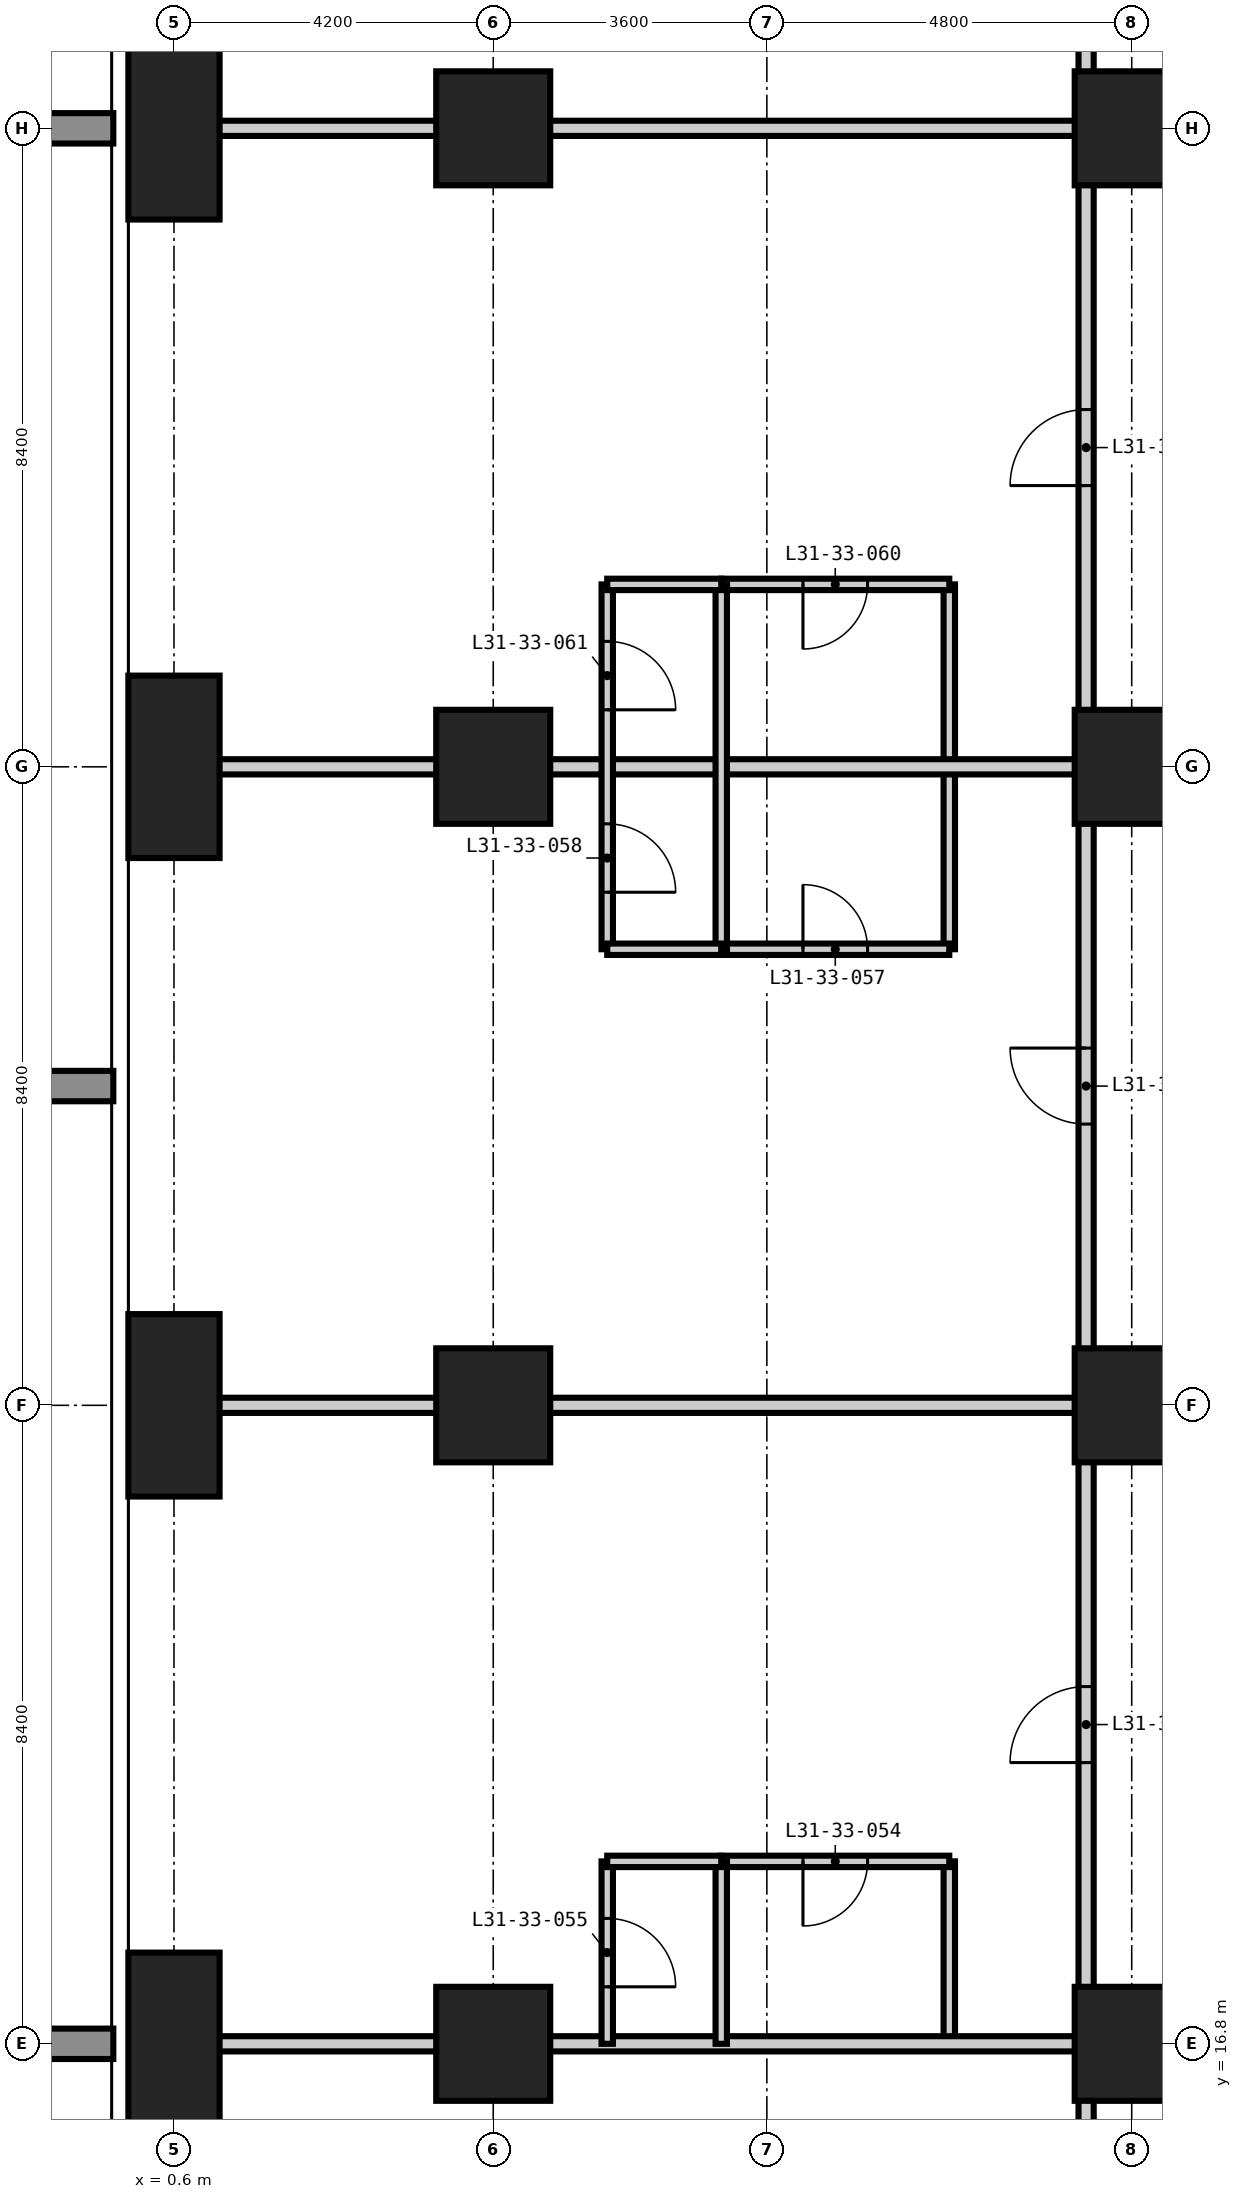
"""IFC4 building model, lengths in metres.
Left out: names, types, materials, properties, quantities, classifications, styles, units other than length and angle.
Written with IfcOpenShell. Run it as: python <this file> out.ifc"""

import sys

from ifc_helpers import new_model, si_unit, direction, frame, frame_2d, origin, origin_2d, place, context, subcontext, project, spatial, rectangle, extrude, element, fill, save


model = new_model("IFC4")
c1 = context("Model", 3, precision=1e-05, world=origin(), true_north=direction((0.0, 1.0)))
c2 = subcontext(c1, "Body", "Model", "MODEL_VIEW")
j1 = project(units=[si_unit("LENGTHUNIT", "METRE"), si_unit("PLANEANGLEUNIT", "RADIAN")], contexts=[c1])
p1 = place(None, origin())
s1 = spatial("IfcSite", under=j1, at=p1, CompositionType="ELEMENT")
p2 = place(p1, origin())
s2 = spatial("IfcBuilding", under=s1, at=p2, CompositionType="ELEMENT")
p3 = place(p2, frame((0.0, 0.0, 122.4)))
s3 = spatial("IfcBuildingStorey", under=s2, at=p3, CompositionType="ELEMENT", Elevation=122.4)
for number, where, z_axis, x_axis in (
    (1, (0.6, 16.8, -0.35), (0.0, 0.0, 1.0), (1.0, 0.0, 0.0)),
    (2, (0.6, 25.2, -0.35), (0.0, 0.0, 1.0), (1.0, 0.0, 0.0)),
    (3, (0.6, 33.6, -0.35), (0.0, 0.0, 1.0), (1.0, 0.0, 0.0)),
    (4, (0.6, 42.0, -0.35), (0.0, 0.0, 1.0), (1.0, 0.0, 0.0)),
):
    element("IfcColumn", number, at=place(p3, frame(where, z_axis=z_axis, x_axis=x_axis)), inside=s3, PredefinedType="COLUMN", context=c2, shape_type="SweptSolid", body=[
        extrude(rectangle(XDim=1.2, YDim=2.4, at=origin_2d()), origin(), (0.0, 0.0, 1.0), 3.6),
    ])
for number, where, z_axis, x_axis in (
    (5, (4.8, 16.8, -0.35), (0.0, 0.0, 1.0), (1.0, 0.0, 0.0)),
    (6, (4.8, 25.2, -0.35), (0.0, 0.0, 1.0), (1.0, 0.0, 0.0)),
    (7, (4.8, 33.6, -0.35), (0.0, 0.0, 1.0), (1.0, 0.0, 0.0)),
    (8, (4.8, 42.0, -0.35), (0.0, 0.0, 1.0), (1.0, 0.0, 0.0)),
    (9, (13.2, 16.8, -0.35), (0.0, 0.0, 1.0), (1.0, 0.0, 0.0)),
    (10, (13.2, 25.2, -0.35), (0.0, 0.0, 1.0), (1.0, 0.0, 0.0)),
    (11, (13.2, 33.6, -0.35), (0.0, 0.0, 1.0), (1.0, 0.0, 0.0)),
    (12, (13.2, 42.0, -0.35), (0.0, 0.0, 1.0), (1.0, 0.0, 0.0)),
):
    element("IfcColumn", number, at=place(p3, frame(where, z_axis=z_axis, x_axis=x_axis)), inside=s3, PredefinedType="COLUMN", context=c2, shape_type="SweptSolid", body=[
        extrude(rectangle(XDim=1.5, YDim=1.5, at=origin_2d()), origin(), (0.0, 0.0, 1.0), 3.6),
    ])
p4 = place(p3, frame((10.8, 16.8, 0.0), z_axis=(0.0, 0.0, 1.0), x_axis=(0.0, 1.0, 0.0)))
e13 = element("IfcWall", 13, at=p4, inside=s3, PredefinedType="PARTITIONING", context=c2, shape_type="SweptSolid", body=[
    extrude(rectangle(XDim=2.4, YDim=0.15, at=frame_2d((1.2, 0.0))), origin(), (0.0, 0.0, 1.0), 3.25),
])
p5 = place(p3, frame((10.8, 31.2, 0.0), z_axis=(0.0, 0.0, 1.0), x_axis=(0.0, 1.0, 0.0)))
e14 = element("IfcWall", 14, at=p5, inside=s3, PredefinedType="PARTITIONING", context=c2, shape_type="SweptSolid", body=[
    extrude(rectangle(XDim=4.8, YDim=0.15, at=frame_2d((2.4, 0.0))), origin(), (0.0, 0.0, 1.0), 3.25),
])
p6 = place(p3, frame((7.8, 19.2, 0.0), z_axis=(0.0, 0.0, 1.0), x_axis=(1.0, 0.0, 0.0)))
e15 = element("IfcWall", 15, at=p6, inside=s3, PredefinedType="PARTITIONING", context=c2, shape_type="SweptSolid", body=[
    extrude(rectangle(XDim=3.0, YDim=0.15, at=frame_2d((1.5, 0.0))), origin(), (0.0, 0.0, 1.0), 3.25),
])
p7 = place(p6, frame((1.075, 0.0, 0.0)))
e16 = element("IfcOpeningElement", 16, at=p7, cuts=e15, PredefinedType="OPENING", context=c2, shape_type="SweptSolid", body=[
    extrude(rectangle(XDim=0.85, YDim=2.1, at=frame_2d((0.425, 1.05))), frame((0.0, 0.085, 0.0), z_axis=(0.0, -1.0, 0.0), x_axis=(1.0, 0.0, 0.0)), (0.0, 0.0, 1.0), 0.17),
])
p8 = place(p3, frame((7.8, 31.2, 0.0), z_axis=(0.0, 0.0, 1.0), x_axis=(1.0, 0.0, 0.0)))
e17 = element("IfcWall", 17, at=p8, inside=s3, PredefinedType="PARTITIONING", context=c2, shape_type="SweptSolid", body=[
    extrude(rectangle(XDim=3.0, YDim=0.15, at=frame_2d((1.5, 0.0))), origin(), (0.0, 0.0, 1.0), 3.25),
])
p9 = place(p8, frame((1.075, 0.0, 0.0)))
e18 = element("IfcOpeningElement", 18, at=p9, cuts=e17, PredefinedType="OPENING", context=c2, shape_type="SweptSolid", body=[
    extrude(rectangle(XDim=0.85, YDim=2.1, at=frame_2d((0.425, 1.05))), frame((0.0, 0.085, 0.0), z_axis=(0.0, -1.0, 0.0), x_axis=(1.0, 0.0, 0.0)), (0.0, 0.0, 1.0), 0.17),
])
p10 = place(p3, frame((7.8, 36.0, 0.0), z_axis=(0.0, 0.0, 1.0), x_axis=(1.0, 0.0, 0.0)))
e19 = element("IfcWall", 19, at=p10, inside=s3, PredefinedType="PARTITIONING", context=c2, shape_type="SweptSolid", body=[
    extrude(rectangle(XDim=3.0, YDim=0.15, at=frame_2d((1.5, 0.0))), origin(), (0.0, 0.0, 1.0), 3.25),
])
p11 = place(p10, frame((1.075, 0.0, 0.0)))
e20 = element("IfcOpeningElement", 20, at=p11, cuts=e19, PredefinedType="OPENING", context=c2, shape_type="SweptSolid", body=[
    extrude(rectangle(XDim=0.85, YDim=2.1, at=frame_2d((0.425, 1.05))), frame((0.0, 0.085, 0.0), z_axis=(0.0, -1.0, 0.0), x_axis=(1.0, 0.0, 0.0)), (0.0, 0.0, 1.0), 0.17),
])
p12 = place(p3, frame((12.6, 13.675, 0.0), z_axis=(0.0, 0.0, 1.0), x_axis=(0.0, 1.0, 0.0)))
e21 = element("IfcWall", 21, at=p12, inside=s3, PredefinedType="PARTITIONING", context=c2, shape_type="SweptSolid", body=[
    extrude(rectangle(XDim=32.05, YDim=0.2, at=frame_2d((16.025, 0.0))), origin(), (0.0, 0.0, 1.0), 3.25),
])
p13 = place(p12, frame((6.825, 0.0, 0.0)))
e22 = element("IfcOpeningElement", 22, at=p13, cuts=e21, PredefinedType="OPENING", context=c2, shape_type="SweptSolid", body=[
    extrude(rectangle(XDim=1.0, YDim=2.2, at=frame_2d((0.5, 1.1))), frame((0.0, 0.11, 0.0), z_axis=(0.0, -1.0, 0.0), x_axis=(1.0, 0.0, 0.0)), (0.0, 0.0, 1.0), 0.22),
])
p14 = place(p12, frame((15.225, 0.0, 0.0)))
e23 = element("IfcOpeningElement", 23, at=p14, cuts=e21, PredefinedType="OPENING", context=c2, shape_type="SweptSolid", body=[
    extrude(rectangle(XDim=1.0, YDim=2.2, at=frame_2d((0.5, 1.1))), frame((0.0, 0.11, 0.0), z_axis=(0.0, -1.0, 0.0), x_axis=(1.0, 0.0, 0.0)), (0.0, 0.0, 1.0), 0.22),
])
p15 = place(p12, frame((23.625, 0.0, 0.0)))
e24 = element("IfcOpeningElement", 24, at=p15, cuts=e21, PredefinedType="OPENING", context=c2, shape_type="SweptSolid", body=[
    extrude(rectangle(XDim=1.0, YDim=2.2, at=frame_2d((0.5, 1.1))), frame((0.0, 0.11, 0.0), z_axis=(0.0, -1.0, 0.0), x_axis=(1.0, 0.0, 0.0)), (0.0, 0.0, 1.0), 0.22),
])
p16 = place(p12, frame((1.063, 0.0, 0.0)))
e25 = element("IfcOpeningElement", 25, at=p16, cuts=e21, PredefinedType="OPENING", context=c2, shape_type="SweptSolid", body=[
    extrude(rectangle(XDim=1.0, YDim=2.2, at=frame_2d((0.5, 1.1))), frame((0.0, 0.11, 0.0), z_axis=(0.0, -1.0, 0.0), x_axis=(1.0, 0.0, 0.0)), (0.0, 0.0, 1.0), 0.22),
])
p17 = place(p12, frame((29.687, 0.0, 0.0)))
e26 = element("IfcOpeningElement", 26, at=p17, cuts=e21, PredefinedType="OPENING", context=c2, shape_type="SweptSolid", body=[
    extrude(rectangle(XDim=1.0, YDim=2.2, at=frame_2d((0.5, 1.1))), frame((0.0, 0.11, 0.0), z_axis=(0.0, -1.0, 0.0), x_axis=(1.0, 0.0, 0.0)), (0.0, 0.0, 1.0), 0.22),
])
for number, where, z_axis, x_axis in (
    (27, (-0.018, 16.8, 0.0), (0.0, 0.0, 1.0), (1.0, 0.0, 0.0)),
    (28, (-0.018, 25.2, 0.0), (0.0, 0.0, 1.0), (1.0, 0.0, 0.0)),
    (29, (-0.018, 33.6, 0.0), (0.0, 0.0, 1.0), (1.0, 0.0, 0.0)),
    (30, (-0.018, 42.0, 0.0), (0.0, 0.0, 1.0), (1.0, 0.0, 0.0)),
):
    element("IfcWall", number, at=place(p3, frame(where, z_axis=z_axis, x_axis=x_axis)), inside=s3, PredefinedType="PARTITIONING", context=c2, shape_type="SweptSolid", body=[
        extrude(rectangle(XDim=12.618, YDim=0.2, at=frame_2d((6.309, 0.0))), origin(), (0.0, 0.0, 1.0), 3.25),
    ])
p18 = place(p3, frame((6.3, 16.8, 0.0), z_axis=(0.0, 0.0, 1.0), x_axis=(0.0, 1.0, 0.0)))
e31 = element("IfcWall", 31, at=p18, inside=s3, PredefinedType="PARTITIONING", context=c2, shape_type="SweptSolid", body=[
    extrude(rectangle(XDim=2.4, YDim=0.15, at=frame_2d((1.2, 0.0))), origin(), (0.0, 0.0, 1.0), 3.25),
])
p19 = place(p18, frame((0.75, 0.0, 0.0)))
e32 = element("IfcOpeningElement", 32, at=p19, cuts=e31, PredefinedType="OPENING", context=c2, shape_type="SweptSolid", body=[
    extrude(rectangle(XDim=0.9, YDim=2.1, at=frame_2d((0.45, 1.05))), frame((0.0, 0.085, 0.0), z_axis=(0.0, -1.0, 0.0), x_axis=(1.0, 0.0, 0.0)), (0.0, 0.0, 1.0), 0.17),
])
p20 = place(p3, frame((6.3, 31.2, 0.0), z_axis=(0.0, 0.0, 1.0), x_axis=(0.0, 1.0, 0.0)))
e33 = element("IfcWall", 33, at=p20, inside=s3, PredefinedType="PARTITIONING", context=c2, shape_type="SweptSolid", body=[
    extrude(rectangle(XDim=4.8, YDim=0.15, at=frame_2d((2.4, 0.0))), origin(), (0.0, 0.0, 1.0), 3.25),
])
p21 = place(p20, frame((0.75, 0.0, 0.0)))
e34 = element("IfcOpeningElement", 34, at=p21, cuts=e33, PredefinedType="OPENING", context=c2, shape_type="SweptSolid", body=[
    extrude(rectangle(XDim=0.9, YDim=2.1, at=frame_2d((0.45, 1.05))), frame((0.0, 0.085, 0.0), z_axis=(0.0, -1.0, 0.0), x_axis=(1.0, 0.0, 0.0)), (0.0, 0.0, 1.0), 0.17),
])
p22 = place(p20, frame((3.15, 0.0, 0.0)))
e35 = element("IfcOpeningElement", 35, at=p22, cuts=e33, PredefinedType="OPENING", context=c2, shape_type="SweptSolid", body=[
    extrude(rectangle(XDim=0.9, YDim=2.1, at=frame_2d((0.45, 1.05))), frame((0.0, 0.085, 0.0), z_axis=(0.0, -1.0, 0.0), x_axis=(1.0, 0.0, 0.0)), (0.0, 0.0, 1.0), 0.17),
])
p23 = place(p3, frame((7.8, 16.8, 0.0), z_axis=(0.0, 0.0, 1.0), x_axis=(0.0, 1.0, 0.0)))
e36 = element("IfcWall", 36, at=p23, inside=s3, PredefinedType="PARTITIONING", context=c2, shape_type="SweptSolid", body=[
    extrude(rectangle(XDim=2.4, YDim=0.15, at=frame_2d((1.2, 0.0))), origin(), (0.0, 0.0, 1.0), 3.25),
])
p24 = place(p3, frame((7.8, 31.2, 0.0), z_axis=(0.0, 0.0, 1.0), x_axis=(0.0, 1.0, 0.0)))
e37 = element("IfcWall", 37, at=p24, inside=s3, PredefinedType="PARTITIONING", context=c2, shape_type="SweptSolid", body=[
    extrude(rectangle(XDim=4.8, YDim=0.15, at=frame_2d((2.4, 0.0))), origin(), (0.0, 0.0, 1.0), 3.25),
])
for number, where, z_axis, x_axis in (
    (38, (6.3, 19.2, 0.0), (0.0, 0.0, 1.0), (1.0, 0.0, 0.0)),
    (39, (6.3, 31.2, 0.0), (0.0, 0.0, 1.0), (1.0, 0.0, 0.0)),
    (40, (6.3, 36.0, 0.0), (0.0, 0.0, 1.0), (1.0, 0.0, 0.0)),
):
    element("IfcWall", number, at=place(p3, frame(where, z_axis=z_axis, x_axis=x_axis)), inside=s3, PredefinedType="PARTITIONING", context=c2, shape_type="SweptSolid", body=[
        extrude(rectangle(XDim=1.5, YDim=0.15, at=frame_2d((0.75, 0.0))), origin(), (0.0, 0.0, 1.0), 3.25),
    ])
p25 = place(p13, origin())
e41 = element("IfcDoor", 41, at=p25, inside=s3, OperationType="SINGLE_SWING_LEFT", PredefinedType="DOOR", context=c2, shape_type="SweptSolid", body=[
    extrude(rectangle(XDim=1.0, YDim=2.2, at=frame_2d((0.5, 1.1))), frame((0.0, 0.025, 0.0), z_axis=(0.0, -1.0, 0.0), x_axis=(1.0, 0.0, 0.0)), (0.0, 0.0, 1.0), 0.05),
])
fill(e22, e41)
p26 = place(p7, frame((0.85, 0.0, 0.0), z_axis=(0.0, 0.0, 1.0), x_axis=(-1.0, 0.0, 0.0)))
e42 = element("IfcDoor", 42, at=p26, inside=s3, OperationType="SINGLE_SWING_RIGHT", PredefinedType="DOOR", context=c2, shape_type="SweptSolid", body=[
    extrude(rectangle(XDim=0.85, YDim=2.1, at=frame_2d((0.425, 1.05))), frame((0.0, 0.025, 0.0), z_axis=(0.0, -1.0, 0.0), x_axis=(1.0, 0.0, 0.0)), (0.0, 0.0, 1.0), 0.05),
])
fill(e16, e42)
p27 = place(p19, frame((0.9, 0.0, 0.0), z_axis=(0.0, 0.0, 1.0), x_axis=(-1.0, 0.0, 0.0)))
e43 = element("IfcDoor", 43, at=p27, inside=s3, OperationType="SINGLE_SWING_RIGHT", PredefinedType="DOOR", context=c2, shape_type="SweptSolid", body=[
    extrude(rectangle(XDim=0.9, YDim=2.1, at=frame_2d((0.45, 1.05))), frame((0.0, 0.025, 0.0), z_axis=(0.0, -1.0, 0.0), x_axis=(1.0, 0.0, 0.0)), (0.0, 0.0, 1.0), 0.05),
])
fill(e32, e43)
p28 = place(p14, origin())
e44 = element("IfcDoor", 44, at=p28, inside=s3, OperationType="SINGLE_SWING_RIGHT", PredefinedType="DOOR", context=c2, shape_type="SweptSolid", body=[
    extrude(rectangle(XDim=1.0, YDim=2.2, at=frame_2d((0.5, 1.1))), frame((0.0, 0.025, 0.0), z_axis=(0.0, -1.0, 0.0), x_axis=(1.0, 0.0, 0.0)), (0.0, 0.0, 1.0), 0.05),
])
fill(e23, e44)
p29 = place(p9, origin())
e45 = element("IfcDoor", 45, at=p29, inside=s3, OperationType="SINGLE_SWING_LEFT", PredefinedType="DOOR", context=c2, shape_type="SweptSolid", body=[
    extrude(rectangle(XDim=0.85, YDim=2.1, at=frame_2d((0.425, 1.05))), frame((0.0, 0.025, 0.0), z_axis=(0.0, -1.0, 0.0), x_axis=(1.0, 0.0, 0.0)), (0.0, 0.0, 1.0), 0.05),
])
fill(e18, e45)
p30 = place(p21, frame((0.9, 0.0, 0.0), z_axis=(0.0, 0.0, 1.0), x_axis=(-1.0, 0.0, 0.0)))
e46 = element("IfcDoor", 46, at=p30, inside=s3, OperationType="SINGLE_SWING_RIGHT", PredefinedType="DOOR", context=c2, shape_type="SweptSolid", body=[
    extrude(rectangle(XDim=0.9, YDim=2.1, at=frame_2d((0.45, 1.05))), frame((0.0, 0.025, 0.0), z_axis=(0.0, -1.0, 0.0), x_axis=(1.0, 0.0, 0.0)), (0.0, 0.0, 1.0), 0.05),
])
fill(e34, e46)
p31 = place(p15, origin())
e47 = element("IfcDoor", 47, at=p31, inside=s3, OperationType="SINGLE_SWING_LEFT", PredefinedType="DOOR", context=c2, shape_type="SweptSolid", body=[
    extrude(rectangle(XDim=1.0, YDim=2.2, at=frame_2d((0.5, 1.1))), frame((0.0, 0.025, 0.0), z_axis=(0.0, -1.0, 0.0), x_axis=(1.0, 0.0, 0.0)), (0.0, 0.0, 1.0), 0.05),
])
fill(e24, e47)
p32 = place(p11, frame((0.85, 0.0, 0.0), z_axis=(0.0, 0.0, 1.0), x_axis=(-1.0, 0.0, 0.0)))
e48 = element("IfcDoor", 48, at=p32, inside=s3, OperationType="SINGLE_SWING_RIGHT", PredefinedType="DOOR", context=c2, shape_type="SweptSolid", body=[
    extrude(rectangle(XDim=0.85, YDim=2.1, at=frame_2d((0.425, 1.05))), frame((0.0, 0.025, 0.0), z_axis=(0.0, -1.0, 0.0), x_axis=(1.0, 0.0, 0.0)), (0.0, 0.0, 1.0), 0.05),
])
fill(e20, e48)
p33 = place(p22, frame((0.9, 0.0, 0.0), z_axis=(0.0, 0.0, 1.0), x_axis=(-1.0, 0.0, 0.0)))
e49 = element("IfcDoor", 49, at=p33, inside=s3, OperationType="SINGLE_SWING_RIGHT", PredefinedType="DOOR", context=c2, shape_type="SweptSolid", body=[
    extrude(rectangle(XDim=0.9, YDim=2.1, at=frame_2d((0.45, 1.05))), frame((0.0, 0.025, 0.0), z_axis=(0.0, -1.0, 0.0), x_axis=(1.0, 0.0, 0.0)), (0.0, 0.0, 1.0), 0.05),
])
fill(e35, e49)
save(model, sys.argv[1])
